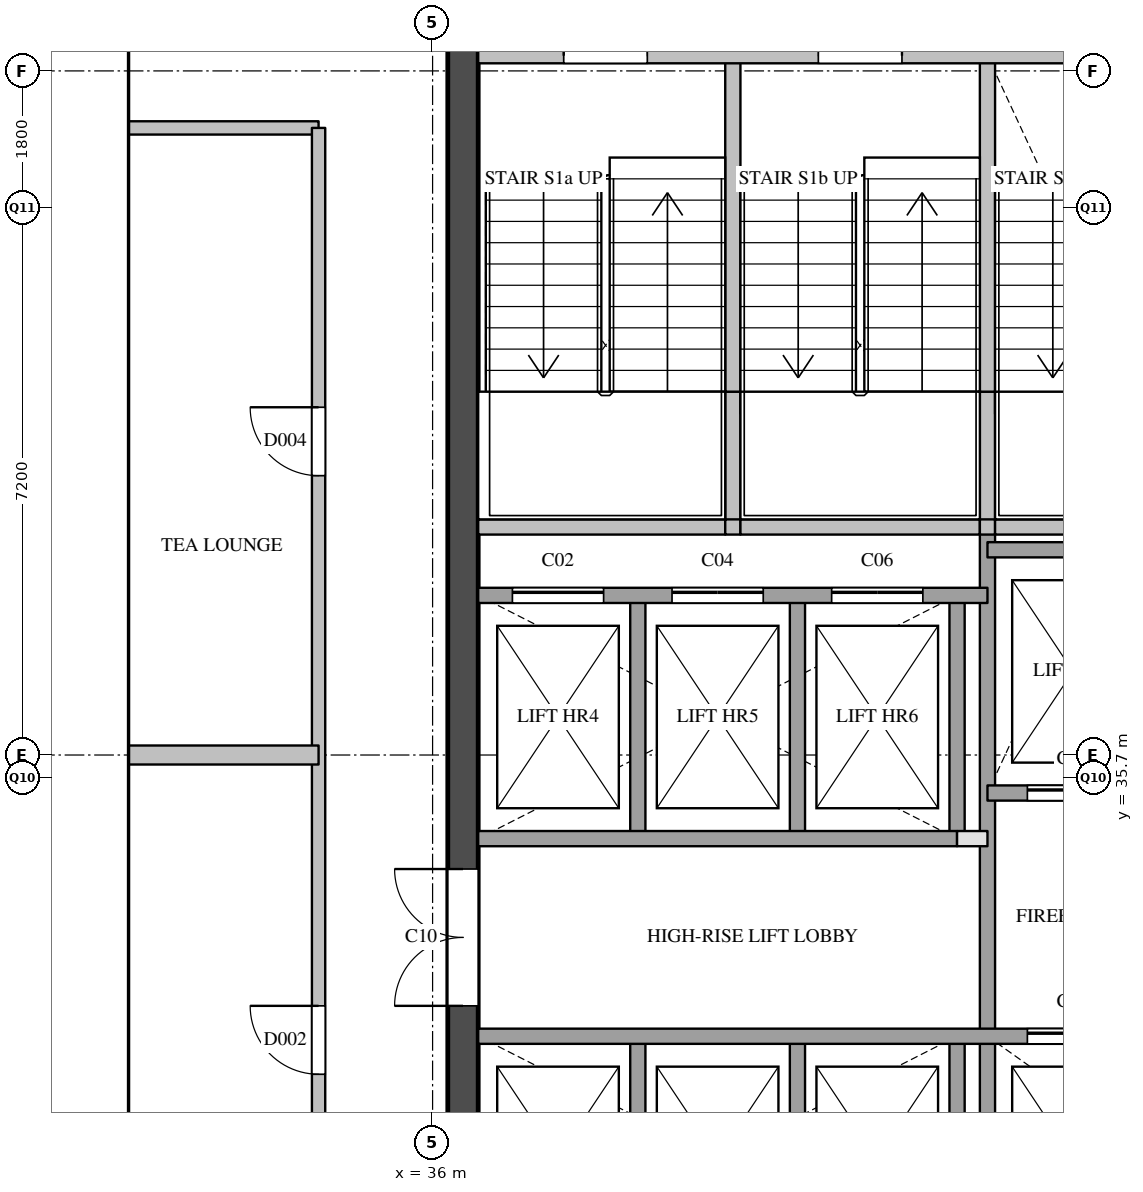
"""IFC4 building model, lengths in metres.
Left out: names, types, materials, properties, quantities, classifications, styles, units other than length and angle.
Written with IfcOpenShell. Run it as: python <this file> out.ifc"""

import sys

from ifc_helpers import new_model, si_unit, direction, frame, frame_2d, origin, place, context, subcontext, project, spatial, rectangle, extrude, element, fill, save


model = new_model("IFC4")
c1 = context("Model", 3, precision=1e-05, world=origin(), true_north=direction((0.0, 1.0)))
c2 = subcontext(c1, "Body", "Model", "MODEL_VIEW")
j1 = project(units=[si_unit("LENGTHUNIT", "METRE"), si_unit("PLANEANGLEUNIT", "RADIAN")], contexts=[c1])
p1 = place(None, origin())
s1 = spatial("IfcSite", under=j1, at=p1, CompositionType="ELEMENT")
p2 = place(p1, origin())
s2 = spatial("IfcBuilding", under=s1, at=p2, CompositionType="ELEMENT")
p3 = place(p2, frame((0.0, 0.0, 215.0)))
s3 = spatial("IfcBuildingStorey", under=s2, at=p3, CompositionType="ELEMENT", Elevation=215.0)
p4 = place(p3, frame((36.4, 29.1, 0.0), z_axis=(0.0, 0.0, 1.0), x_axis=(0.0, 1.0, 0.0)))
e1 = element("IfcWall", 1, at=p4, inside=s3, PredefinedType="SHEAR", context=c2, shape_type="SweptSolid", body=[
    extrude(rectangle(XDim=20.3, YDim=0.4, at=frame_2d((10.15, 0.0))), origin(), (0.0, 0.0, 1.0), 3.6),
])
p5 = place(p4, frame((3.6, 0.0, 0.0)))
e2 = element("IfcOpeningElement", 2, at=p5, cuts=e1, PredefinedType="OPENING", context=c2, shape_type="SweptSolid", body=[
    extrude(rectangle(XDim=1.8, YDim=2.1, at=frame_2d((0.9, 1.05))), frame((0.0, 0.21, 0.0), z_axis=(0.0, -1.0, 0.0), x_axis=(1.0, 0.0, 0.0)), (0.0, 0.0, 1.0), 0.42),
])
p6 = place(p4, frame((16.4, 0.0, 0.0)))
e3 = element("IfcOpeningElement", 3, at=p6, cuts=e1, PredefinedType="OPENING", context=c2, shape_type="SweptSolid", body=[
    extrude(rectangle(XDim=1.0, YDim=2.1, at=frame_2d((0.5, 1.05))), frame((0.0, 0.21, 0.0), z_axis=(0.0, -1.0, 0.0), x_axis=(1.0, 0.0, 0.0)), (0.0, 0.0, 1.0), 0.42),
])
p7 = place(p3, frame((38.7, 29.1, 0.0), z_axis=(0.0, 0.0, 1.0), x_axis=(0.0, 1.0, 0.0)))
e4 = element("IfcWall", 4, at=p7, inside=s3, PredefinedType="SOLIDWALL", context=c2, shape_type="SweptSolid", body=[
    extrude(rectangle(XDim=3.2, YDim=0.2, at=frame_2d((1.6, 0.0))), origin(), (0.0, 0.0, 1.0), 3.6),
])
p8 = place(p3, frame((38.7, 34.9, 0.0), z_axis=(0.0, 0.0, 1.0), x_axis=(0.0, 1.0, 0.0)))
e5 = element("IfcWall", 5, at=p8, inside=s3, PredefinedType="SOLIDWALL", context=c2, shape_type="SweptSolid", body=[
    extrude(rectangle(XDim=3.2, YDim=0.2, at=frame_2d((1.6, 0.0))), origin(), (0.0, 0.0, 1.0), 3.6),
])
p9 = place(p3, frame((39.95, 39.0, 0.0), z_axis=(0.0, 0.0, 1.0), x_axis=(0.0, 1.0, 0.0)))
e6 = element("IfcWall", 6, at=p9, inside=s3, PredefinedType="SOLIDWALL", context=c2, shape_type="SweptSolid", body=[
    extrude(rectangle(XDim=1.78, YDim=0.2, at=frame_2d((0.89, 0.0))), origin(), (0.0, 0.0, 1.0), 3.6),
])
p10 = place(p3, frame((39.95, 40.78, 0.0), z_axis=(0.0, 0.0, 1.0), x_axis=(0.0, 1.0, 0.0)))
e7 = element("IfcWall", 7, at=p10, inside=s3, PredefinedType="SOLIDWALL", context=c2, shape_type="SweptSolid", body=[
    extrude(rectangle(XDim=4.42, YDim=0.2, at=frame_2d((2.21, 0.0))), origin(), (0.0, 0.0, 1.0), 3.6),
])
p11 = place(p3, frame((40.8, 29.1, 0.0), z_axis=(0.0, 0.0, 1.0), x_axis=(0.0, 1.0, 0.0)))
e8 = element("IfcWall", 8, at=p11, inside=s3, PredefinedType="SOLIDWALL", context=c2, shape_type="SweptSolid", body=[
    extrude(rectangle(XDim=3.2, YDim=0.2, at=frame_2d((1.6, 0.0))), origin(), (0.0, 0.0, 1.0), 3.6),
])
p12 = place(p3, frame((40.8, 34.9, 0.0), z_axis=(0.0, 0.0, 1.0), x_axis=(0.0, 1.0, 0.0)))
e9 = element("IfcWall", 9, at=p12, inside=s3, PredefinedType="SOLIDWALL", context=c2, shape_type="SweptSolid", body=[
    extrude(rectangle(XDim=3.2, YDim=0.2, at=frame_2d((1.6, 0.0))), origin(), (0.0, 0.0, 1.0), 3.6),
])
p13 = place(p3, frame((42.9, 29.1, 0.0), z_axis=(0.0, 0.0, 1.0), x_axis=(0.0, 1.0, 0.0)))
e10 = element("IfcWall", 10, at=p13, inside=s3, PredefinedType="SOLIDWALL", context=c2, shape_type="SweptSolid", body=[
    extrude(rectangle(XDim=3.2, YDim=0.2, at=frame_2d((1.6, 0.0))), origin(), (0.0, 0.0, 1.0), 3.6),
])
p14 = place(p3, frame((42.9, 34.9, 0.0), z_axis=(0.0, 0.0, 1.0), x_axis=(0.0, 1.0, 0.0)))
e11 = element("IfcWall", 11, at=p14, inside=s3, PredefinedType="SOLIDWALL", context=c2, shape_type="SweptSolid", body=[
    extrude(rectangle(XDim=3.2, YDim=0.2, at=frame_2d((1.6, 0.0))), origin(), (0.0, 0.0, 1.0), 3.6),
])
p15 = place(p3, frame((43.3, 29.1, 0.0), z_axis=(0.0, 0.0, 1.0), x_axis=(0.0, 1.0, 0.0)))
e12 = element("IfcWall", 12, at=p15, inside=s3, PredefinedType="SOLIDWALL", context=c2, shape_type="SweptSolid", body=[
    extrude(rectangle(XDim=9.9, YDim=0.2, at=frame_2d((4.95, 0.0))), origin(), (0.0, 0.0, 1.0), 3.6),
])
p16 = place(p3, frame((43.3, 39.0, 0.0), z_axis=(0.0, 0.0, 1.0), x_axis=(0.0, 1.0, 0.0)))
e13 = element("IfcWall", 13, at=p16, inside=s3, PredefinedType="SOLIDWALL", context=c2, shape_type="SweptSolid", body=[
    extrude(rectangle(XDim=1.78, YDim=0.2, at=frame_2d((0.89, 0.0))), origin(), (0.0, 0.0, 1.0), 3.6),
])
p17 = place(p3, frame((43.3, 40.78, 0.0), z_axis=(0.0, 0.0, 1.0), x_axis=(0.0, 1.0, 0.0)))
e14 = element("IfcWall", 14, at=p17, inside=s3, PredefinedType="SOLIDWALL", context=c2, shape_type="SweptSolid", body=[
    extrude(rectangle(XDim=4.42, YDim=0.2, at=frame_2d((2.21, 0.0))), origin(), (0.0, 0.0, 1.0), 3.6),
])
p18 = place(p3, frame((36.6, 32.3, 0.0), z_axis=(0.0, 0.0, 1.0), x_axis=(1.0, 0.0, 0.0)))
e15 = element("IfcWall", 15, at=p18, inside=s3, PredefinedType="SOLIDWALL", context=c2, shape_type="SweptSolid", body=[
    extrude(rectangle(XDim=11.2, YDim=0.2, at=frame_2d((5.6, 0.0))), origin(), (0.0, 0.0, 1.0), 3.6),
])
p19 = place(p18, frame((7.225, 0.0, 0.0)))
e16 = element("IfcOpeningElement", 16, at=p19, cuts=e15, PredefinedType="OPENING", context=c2, shape_type="SweptSolid", body=[
    extrude(rectangle(XDim=1.2, YDim=2.1, at=frame_2d((0.6, 1.05))), frame((0.0, 0.11, 0.0), z_axis=(0.0, -1.0, 0.0), x_axis=(1.0, 0.0, 0.0)), (0.0, 0.0, 1.0), 0.22),
])
p20 = place(p18, frame((9.475, 0.0, 0.0)))
e17 = element("IfcOpeningElement", 17, at=p20, cuts=e15, PredefinedType="OPENING", context=c2, shape_type="SweptSolid", body=[
    extrude(rectangle(XDim=1.2, YDim=2.1, at=frame_2d((0.6, 1.05))), frame((0.0, 0.11, 0.0), z_axis=(0.0, -1.0, 0.0), x_axis=(1.0, 0.0, 0.0)), (0.0, 0.0, 1.0), 0.22),
])
p21 = place(p3, frame((42.9, 34.9, 0.0), z_axis=(0.0, 0.0, 1.0), x_axis=(1.0, 0.0, 0.0)))
e18 = element("IfcWall", 18, at=p21, inside=s3, PredefinedType="PARTITIONING", context=c2, shape_type="SweptSolid", body=[
    extrude(rectangle(XDim=0.4, YDim=0.2, at=frame_2d((0.2, 0.0))), origin(), (0.0, 0.0, 1.0), 3.6),
])
p22 = place(p3, frame((36.6, 34.9, 0.0), z_axis=(0.0, 0.0, 1.0), x_axis=(1.0, 0.0, 0.0)))
e19 = element("IfcWall", 19, at=p22, inside=s3, PredefinedType="SOLIDWALL", context=c2, shape_type="SweptSolid", body=[
    extrude(rectangle(XDim=6.3, YDim=0.2, at=frame_2d((3.15, 0.0))), origin(), (0.0, 0.0, 1.0), 3.6),
])
p23 = place(p3, frame((43.3, 35.5, 0.0), z_axis=(0.0, 0.0, 1.0), x_axis=(1.0, 0.0, 0.0)))
e20 = element("IfcWall", 20, at=p23, inside=s3, PredefinedType="SOLIDWALL", context=c2, shape_type="SweptSolid", body=[
    extrude(rectangle(XDim=4.5, YDim=0.2, at=frame_2d((2.25, 0.0))), origin(), (0.0, 0.0, 1.0), 3.6),
])
p24 = place(p23, frame((0.525, 0.0, 0.0)))
e21 = element("IfcOpeningElement", 21, at=p24, cuts=e20, PredefinedType="OPENING", context=c2, shape_type="SweptSolid", body=[
    extrude(rectangle(XDim=1.2, YDim=2.1, at=frame_2d((0.6, 1.05))), frame((0.0, 0.11, 0.0), z_axis=(0.0, -1.0, 0.0), x_axis=(1.0, 0.0, 0.0)), (0.0, 0.0, 1.0), 0.22),
])
p25 = place(p23, frame((3.025, 0.0, 0.0)))
e22 = element("IfcOpeningElement", 22, at=p25, cuts=e20, PredefinedType="OPENING", context=c2, shape_type="SweptSolid", body=[
    extrude(rectangle(XDim=0.7, YDim=2.1, at=frame_2d((0.35, 1.05))), frame((0.0, 0.11, 0.0), z_axis=(0.0, -1.0, 0.0), x_axis=(1.0, 0.0, 0.0)), (0.0, 0.0, 1.0), 0.22),
])
p26 = place(p3, frame((36.6, 38.1, 0.0), z_axis=(0.0, 0.0, 1.0), x_axis=(1.0, 0.0, 0.0)))
e23 = element("IfcWall", 23, at=p26, inside=s3, PredefinedType="SOLIDWALL", context=c2, shape_type="SweptSolid", body=[
    extrude(rectangle(XDim=6.7, YDim=0.2, at=frame_2d((3.35, 0.0))), origin(), (0.0, 0.0, 1.0), 3.6),
])
p27 = place(p26, frame((0.45, 0.0, 0.0)))
e24 = element("IfcOpeningElement", 24, at=p27, cuts=e23, PredefinedType="OPENING", context=c2, shape_type="SweptSolid", body=[
    extrude(rectangle(XDim=1.2, YDim=2.1, at=frame_2d((0.6, 1.05))), frame((0.0, 0.11, 0.0), z_axis=(0.0, -1.0, 0.0), x_axis=(1.0, 0.0, 0.0)), (0.0, 0.0, 1.0), 0.22),
])
p28 = place(p26, frame((2.55, 0.0, 0.0)))
e25 = element("IfcOpeningElement", 25, at=p28, cuts=e23, PredefinedType="OPENING", context=c2, shape_type="SweptSolid", body=[
    extrude(rectangle(XDim=1.2, YDim=2.1, at=frame_2d((0.6, 1.05))), frame((0.0, 0.11, 0.0), z_axis=(0.0, -1.0, 0.0), x_axis=(1.0, 0.0, 0.0)), (0.0, 0.0, 1.0), 0.22),
])
p29 = place(p26, frame((4.65, 0.0, 0.0)))
e26 = element("IfcOpeningElement", 26, at=p29, cuts=e23, PredefinedType="OPENING", context=c2, shape_type="SweptSolid", body=[
    extrude(rectangle(XDim=1.2, YDim=2.1, at=frame_2d((0.6, 1.05))), frame((0.0, 0.11, 0.0), z_axis=(0.0, -1.0, 0.0), x_axis=(1.0, 0.0, 0.0)), (0.0, 0.0, 1.0), 0.22),
])
p30 = place(p3, frame((43.3, 38.7, 0.0), z_axis=(0.0, 0.0, 1.0), x_axis=(1.0, 0.0, 0.0)))
e27 = element("IfcWall", 27, at=p30, inside=s3, PredefinedType="SOLIDWALL", context=c2, shape_type="SweptSolid", body=[
    extrude(rectangle(XDim=4.5, YDim=0.2, at=frame_2d((2.25, 0.0))), origin(), (0.0, 0.0, 1.0), 3.6),
])
p31 = place(p3, frame((36.6, 39.0, 0.0), z_axis=(0.0, 0.0, 1.0), x_axis=(1.0, 0.0, 0.0)))
e28 = element("IfcWall", 28, at=p31, inside=s3, PredefinedType="SOLIDWALL", context=c2, shape_type="SweptSolid", body=[
    extrude(rectangle(XDim=3.25, YDim=0.2, at=frame_2d((1.625, 0.0))), origin(), (0.0, 0.0, 1.0), 3.6),
])
p32 = place(p3, frame((39.85, 39.0, 0.0), z_axis=(0.0, 0.0, 1.0), x_axis=(1.0, 0.0, 0.0)))
e29 = element("IfcWall", 29, at=p32, inside=s3, PredefinedType="SOLIDWALL", context=c2, shape_type="SweptSolid", body=[
    extrude(rectangle(XDim=0.2, YDim=0.2, at=frame_2d((0.1, 0.0))), origin(), (0.0, 0.0, 1.0), 3.6),
])
p33 = place(p3, frame((40.05, 39.0, 0.0), z_axis=(0.0, 0.0, 1.0), x_axis=(1.0, 0.0, 0.0)))
e30 = element("IfcWall", 30, at=p33, inside=s3, PredefinedType="SOLIDWALL", context=c2, shape_type="SweptSolid", body=[
    extrude(rectangle(XDim=3.15, YDim=0.2, at=frame_2d((1.575, 0.0))), origin(), (0.0, 0.0, 1.0), 3.6),
])
p34 = place(p3, frame((43.2, 39.0, 0.0), z_axis=(0.0, 0.0, 1.0), x_axis=(1.0, 0.0, 0.0)))
e31 = element("IfcWall", 31, at=p34, inside=s3, PredefinedType="SOLIDWALL", context=c2, shape_type="SweptSolid", body=[
    extrude(rectangle(XDim=0.2, YDim=0.2, at=frame_2d((0.1, 0.0))), origin(), (0.0, 0.0, 1.0), 3.6),
])
p35 = place(p3, frame((43.4, 39.0, 0.0), z_axis=(0.0, 0.0, 1.0), x_axis=(1.0, 0.0, 0.0)))
e32 = element("IfcWall", 32, at=p35, inside=s3, PredefinedType="SOLIDWALL", context=c2, shape_type="SweptSolid", body=[
    extrude(rectangle(XDim=3.25, YDim=0.2, at=frame_2d((1.625, 0.0))), origin(), (0.0, 0.0, 1.0), 3.6),
])
p36 = place(p3, frame((36.6, 45.2, 0.0), z_axis=(0.0, 0.0, 1.0), x_axis=(1.0, 0.0, 0.0)))
e33 = element("IfcWall", 33, at=p36, inside=s3, PredefinedType="SOLIDWALL", context=c2, shape_type="SweptSolid", body=[
    extrude(rectangle(XDim=10.05, YDim=0.2, at=frame_2d((5.025, 0.0))), origin(), (0.0, 0.0, 1.0), 3.6),
])
p37 = place(p36, frame((1.125, 0.0, 0.0)))
e34 = element("IfcOpeningElement", 34, at=p37, cuts=e33, PredefinedType="OPENING", context=c2, shape_type="SweptSolid", body=[
    extrude(rectangle(XDim=1.1, YDim=2.1, at=frame_2d((0.55, 1.05))), frame((0.0, 0.11, 0.0), z_axis=(0.0, -1.0, 0.0), x_axis=(1.0, 0.0, 0.0)), (0.0, 0.0, 1.0), 0.22),
])
p38 = place(p36, frame((4.475, 0.0, 0.0)))
e35 = element("IfcOpeningElement", 35, at=p38, cuts=e33, PredefinedType="OPENING", context=c2, shape_type="SweptSolid", body=[
    extrude(rectangle(XDim=1.1, YDim=2.1, at=frame_2d((0.55, 1.05))), frame((0.0, 0.11, 0.0), z_axis=(0.0, -1.0, 0.0), x_axis=(1.0, 0.0, 0.0)), (0.0, 0.0, 1.0), 0.22),
])
p39 = place(p36, frame((7.825, 0.0, 0.0)))
e36 = element("IfcOpeningElement", 36, at=p39, cuts=e33, PredefinedType="OPENING", context=c2, shape_type="SweptSolid", body=[
    extrude(rectangle(XDim=1.1, YDim=2.1, at=frame_2d((0.55, 1.05))), frame((0.0, 0.11, 0.0), z_axis=(0.0, -1.0, 0.0), x_axis=(1.0, 0.0, 0.0)), (0.0, 0.0, 1.0), 0.22),
])
p40 = place(p3, frame((32.0, 44.25, 0.0), z_axis=(0.0, 0.0, 1.0), x_axis=(1.0, 0.0, 0.0)))
e37 = element("IfcWall", 37, at=p40, inside=s3, PredefinedType="PARTITIONING", context=c2, shape_type="SweptSolid", body=[
    extrude(rectangle(XDim=2.5, YDim=0.175, at=frame_2d((1.25, 0.0))), origin(), (0.0, 0.0, 1.0), 3.6),
])
p41 = place(p3, frame((34.5, 28.5, 0.0), z_axis=(0.0, 0.0, 1.0), x_axis=(0.0, 1.0, 0.0)))
e38 = element("IfcWall", 38, at=p41, inside=s3, PredefinedType="PARTITIONING", context=c2, shape_type="SweptSolid", body=[
    extrude(rectangle(XDim=15.75, YDim=0.175, at=frame_2d((7.875, 0.0))), origin(), (0.0, 0.0, 1.0), 3.6),
])
p42 = place(p41, frame((3.3, 0.0, 0.0)))
e39 = element("IfcOpeningElement", 39, at=p42, cuts=e38, PredefinedType="OPENING", context=c2, shape_type="SweptSolid", body=[
    extrude(rectangle(XDim=0.9, YDim=2.1, at=frame_2d((0.45, 1.05))), frame((0.0, 0.097, 0.0), z_axis=(0.0, -1.0, 0.0), x_axis=(1.0, 0.0, 0.0)), (0.0, 0.0, 1.0), 0.195),
])
p43 = place(p41, frame((11.175, 0.0, 0.0)))
e40 = element("IfcOpeningElement", 40, at=p43, cuts=e38, PredefinedType="OPENING", context=c2, shape_type="SweptSolid", body=[
    extrude(rectangle(XDim=0.9, YDim=2.1, at=frame_2d((0.45, 1.05))), frame((0.0, 0.097, 0.0), z_axis=(0.0, -1.0, 0.0), x_axis=(1.0, 0.0, 0.0)), (0.0, 0.0, 1.0), 0.195),
])
p44 = place(p3, frame((32.0, 36.0, 0.0), z_axis=(0.0, 0.0, 1.0), x_axis=(1.0, 0.0, 0.0)))
e41 = element("IfcWall", 41, at=p44, inside=s3, PredefinedType="PARTITIONING", context=c2, shape_type="SweptSolid", body=[
    extrude(rectangle(XDim=2.5, YDim=0.25, at=frame_2d((1.25, 0.0))), origin(), (0.0, 0.0, 1.0), 3.6),
])
p45 = place(p27, origin())
e42 = element("IfcDoor", 42, at=p45, inside=s3, OperationType="SLIDING_TO_LEFT", PredefinedType="DOOR", context=c2, shape_type="SweptSolid", body=[
    extrude(rectangle(XDim=1.2, YDim=2.1, at=frame_2d((0.6, 1.05))), frame((0.0, 0.025, 0.0), z_axis=(0.0, -1.0, 0.0), x_axis=(1.0, 0.0, 0.0)), (0.0, 0.0, 1.0), 0.05),
])
fill(e24, e42)
p46 = place(p28, origin())
e43 = element("IfcDoor", 43, at=p46, inside=s3, OperationType="SLIDING_TO_LEFT", PredefinedType="DOOR", context=c2, shape_type="SweptSolid", body=[
    extrude(rectangle(XDim=1.2, YDim=2.1, at=frame_2d((0.6, 1.05))), frame((0.0, 0.025, 0.0), z_axis=(0.0, -1.0, 0.0), x_axis=(1.0, 0.0, 0.0)), (0.0, 0.0, 1.0), 0.05),
])
fill(e25, e43)
p47 = place(p29, origin())
e44 = element("IfcDoor", 44, at=p47, inside=s3, OperationType="SLIDING_TO_LEFT", PredefinedType="DOOR", context=c2, shape_type="SweptSolid", body=[
    extrude(rectangle(XDim=1.2, YDim=2.1, at=frame_2d((0.6, 1.05))), frame((0.0, 0.025, 0.0), z_axis=(0.0, -1.0, 0.0), x_axis=(1.0, 0.0, 0.0)), (0.0, 0.0, 1.0), 0.05),
])
fill(e26, e44)
p48 = place(p19, origin())
e45 = element("IfcDoor", 45, at=p48, inside=s3, OperationType="SLIDING_TO_LEFT", PredefinedType="DOOR", context=c2, shape_type="SweptSolid", body=[
    extrude(rectangle(XDim=1.2, YDim=2.1, at=frame_2d((0.6, 1.05))), frame((0.0, 0.025, 0.0), z_axis=(0.0, -1.0, 0.0), x_axis=(1.0, 0.0, 0.0)), (0.0, 0.0, 1.0), 0.05),
])
fill(e16, e45)
p49 = place(p24, origin())
e46 = element("IfcDoor", 46, at=p49, inside=s3, OperationType="SLIDING_TO_LEFT", PredefinedType="DOOR", context=c2, shape_type="SweptSolid", body=[
    extrude(rectangle(XDim=1.2, YDim=2.1, at=frame_2d((0.6, 1.05))), frame((0.0, 0.025, 0.0), z_axis=(0.0, -1.0, 0.0), x_axis=(1.0, 0.0, 0.0)), (0.0, 0.0, 1.0), 0.05),
])
fill(e21, e46)
p50 = place(p5, origin())
e47 = element("IfcDoor", 47, at=p50, inside=s3, OperationType="DOUBLE_DOOR_SINGLE_SWING", PredefinedType="DOOR", context=c2, shape_type="SweptSolid", body=[
    extrude(rectangle(XDim=1.8, YDim=2.1, at=frame_2d((0.9, 1.05))), frame((0.0, 0.025, 0.0), z_axis=(0.0, -1.0, 0.0), x_axis=(1.0, 0.0, 0.0)), (0.0, 0.0, 1.0), 0.05),
])
fill(e2, e47)
p51 = place(p37, origin())
e48 = element("IfcDoor", 48, at=p51, inside=s3, OperationType="SINGLE_SWING_LEFT", PredefinedType="DOOR", context=c2, shape_type="SweptSolid", body=[
    extrude(rectangle(XDim=1.1, YDim=2.1, at=frame_2d((0.55, 1.05))), frame((0.0, 0.025, 0.0), z_axis=(0.0, -1.0, 0.0), x_axis=(1.0, 0.0, 0.0)), (0.0, 0.0, 1.0), 0.05),
])
fill(e34, e48)
p52 = place(p38, origin())
e49 = element("IfcDoor", 49, at=p52, inside=s3, OperationType="SINGLE_SWING_RIGHT", PredefinedType="DOOR", context=c2, shape_type="SweptSolid", body=[
    extrude(rectangle(XDim=1.1, YDim=2.1, at=frame_2d((0.55, 1.05))), frame((0.0, 0.025, 0.0), z_axis=(0.0, -1.0, 0.0), x_axis=(1.0, 0.0, 0.0)), (0.0, 0.0, 1.0), 0.05),
])
fill(e35, e49)
p53 = place(p42, origin())
e50 = element("IfcDoor", 50, at=p53, inside=s3, OperationType="SINGLE_SWING_RIGHT", PredefinedType="DOOR", context=c2, shape_type="SweptSolid", body=[
    extrude(rectangle(XDim=0.9, YDim=2.1, at=frame_2d((0.45, 1.05))), frame((0.0, 0.025, 0.0), z_axis=(0.0, -1.0, 0.0), x_axis=(1.0, 0.0, 0.0)), (0.0, 0.0, 1.0), 0.05),
])
fill(e39, e50)
p54 = place(p43, origin())
e51 = element("IfcDoor", 51, at=p54, inside=s3, OperationType="SINGLE_SWING_RIGHT", PredefinedType="DOOR", context=c2, shape_type="SweptSolid", body=[
    extrude(rectangle(XDim=0.9, YDim=2.1, at=frame_2d((0.45, 1.05))), frame((0.0, 0.025, 0.0), z_axis=(0.0, -1.0, 0.0), x_axis=(1.0, 0.0, 0.0)), (0.0, 0.0, 1.0), 0.05),
])
fill(e40, e51)
save(model, sys.argv[1])
